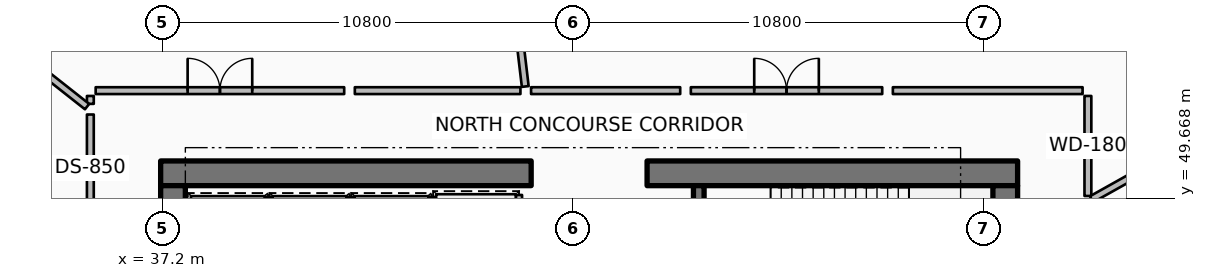
"""IFC4 building model, lengths in metres.
Left out: names, types, materials, properties, quantities, classifications, styles, units other than length and angle.
Written with IfcOpenShell. Run it as: python <this file> out.ifc"""

import sys

from ifc_helpers import new_model, si_unit, direction, frame, frame_2d, origin, place, context, subcontext, project, spatial, rectangle, extrude, element, fill, save


model = new_model("IFC4")
c1 = context("Model", 3, precision=1e-05, world=origin(), true_north=direction((0.0, 1.0)))
c2 = subcontext(c1, "Body", "Model", "MODEL_VIEW")
j1 = project(units=[si_unit("LENGTHUNIT", "METRE"), si_unit("PLANEANGLEUNIT", "RADIAN")], contexts=[c1])
p1 = place(None, origin())
s1 = spatial("IfcSite", under=j1, at=p1, CompositionType="ELEMENT")
p2 = place(p1, origin())
s2 = spatial("IfcBuilding", under=s1, at=p2, CompositionType="ELEMENT")
p3 = place(p2, frame((0.0, 0.0, 231.9)))
s3 = spatial("IfcBuildingStorey", under=s2, at=p3, CompositionType="ELEMENT", Elevation=231.9)
for number, where, z_axis, x_axis in (
    (1, (37.15, 50.325, 0.0), (0.0, 0.0, 1.0), (1.0, 0.0, 0.0)),
    (2, (49.95, 50.325, 0.0), (0.0, 0.0, 1.0), (1.0, 0.0, 0.0)),
):
    element("IfcWall", number, at=place(p3, frame(where, z_axis=z_axis, x_axis=x_axis)), inside=s3, PredefinedType="SHEAR", context=c2, shape_type="SweptSolid", body=[
        extrude(rectangle(XDim=9.75, YDim=0.65, at=frame_2d((4.875, 0.0))), origin(), (0.0, 0.0, 1.0), 4.8),
    ])
for number, where, z_axis, x_axis in (
    (3, (37.475, 34.0, 0.0), (0.0, 0.0, 1.0), (0.0, 1.0, 0.0)),
    (4, (59.375, 34.0, 0.0), (0.0, 0.0, 1.0), (0.0, 1.0, 0.0)),
):
    element("IfcWall", number, at=place(p3, frame(where, z_axis=z_axis, x_axis=x_axis)), inside=s3, PredefinedType="SHEAR", context=c2, shape_type="SweptSolid", body=[
        extrude(rectangle(XDim=16.0, YDim=0.65, at=frame_2d((8.0, 0.0))), origin(), (0.0, 0.0, 1.0), 4.8),
    ])
p4 = place(p3, frame((51.31, 46.5, 0.0), z_axis=(0.0, 0.0, 1.0), x_axis=(0.0, 1.0, 0.0)))
e5 = element("IfcWall", 5, at=p4, inside=s3, PredefinedType="SHEAR", context=c2, shape_type="SweptSolid", body=[
    extrude(rectangle(XDim=3.5, YDim=0.28, at=frame_2d((1.75, 0.0))), origin(), (0.0, 0.0, 1.0), 4.8),
])
for number, where, z_axis, x_axis in (
    (6, (39.975, 48.095, 0.0), (0.0, 0.0, 1.0), (0.0, 1.0, 0.0)),
    (7, (42.125, 48.095, 0.0), (0.0, 0.0, 1.0), (0.0, 1.0, 0.0)),
    (8, (44.275, 48.095, 0.0), (0.0, 0.0, 1.0), (0.0, 1.0, 0.0)),
):
    element("IfcWall", number, at=place(p3, frame(where, z_axis=z_axis, x_axis=x_axis)), inside=s3, PredefinedType="PARTITIONING", context=c2, shape_type="SweptSolid", body=[
        extrude(rectangle(XDim=1.61, YDim=0.16, at=frame_2d((0.805, 0.0))), origin(), (0.0, 0.0, 1.0), 4.4),
    ])
p5 = place(p3, frame((46.58, 48.045, 0.0), z_axis=(0.0, 0.0, 1.0), x_axis=(0.0, 1.0, 0.0)))
e9 = element("IfcWall", 9, at=p5, inside=s3, PredefinedType="PARTITIONING", context=c2, shape_type="SweptSolid", body=[
    extrude(rectangle(XDim=1.71, YDim=0.16, at=frame_2d((0.855, 0.0))), origin(), (0.0, 0.0, 1.0), 4.4),
])
p6 = place(p3, frame((61.55, 49.729, 0.0), z_axis=(0.0, 0.0, 1.0), x_axis=(0.0, 1.0, 0.0)))
e10 = element("IfcWall", 10, at=p6, inside=s3, PredefinedType="PARTITIONING", context=c2, shape_type="SweptSolid", body=[
    extrude(rectangle(XDim=2.632, YDim=0.18, at=frame_2d((1.316, 0.0))), origin(), (0.0, 0.0, 1.0), 3.357),
])
p7 = place(p3, frame((61.41, 52.5, 0.0), z_axis=(0.0, 0.0, 1.0), x_axis=(-1.0, 0.0, 0.0)))
e11 = element("IfcWall", 11, at=p7, inside=s3, PredefinedType="PARTITIONING", context=c2, shape_type="SweptSolid", body=[
    extrude(rectangle(XDim=4.992, YDim=0.18, at=frame_2d((2.496, 0.0))), origin(), (0.0, 0.0, 1.0), 3.357),
])
p8 = place(p3, frame((56.137, 52.5, 0.0), z_axis=(0.0, 0.0, 1.0), x_axis=(-1.0, 0.0, 0.0)))
e12 = element("IfcWall", 12, at=p8, inside=s3, PredefinedType="PARTITIONING", context=c2, shape_type="SweptSolid", body=[
    extrude(rectangle(XDim=5.036, YDim=0.18, at=frame_2d((2.518, 0.0))), origin(), (0.0, 0.0, 1.0), 3.357),
])
p9 = place(p8, frame((1.668, 0.0, 0.0)))
e13 = element("IfcOpeningElement", 13, at=p9, cuts=e12, PredefinedType="OPENING", context=c2, shape_type="SweptSolid", body=[
    extrude(rectangle(XDim=1.7, YDim=2.15, at=frame_2d((0.85, 1.075))), frame((0.0, 0.1, 0.0), z_axis=(0.0, -1.0, 0.0), x_axis=(1.0, 0.0, 0.0)), (0.0, 0.0, 1.0), 0.2),
])
p10 = place(p3, frame((50.821, 52.5, 0.0), z_axis=(0.0, 0.0, 1.0), x_axis=(-1.0, 0.0, 0.0)))
e14 = element("IfcWall", 14, at=p10, inside=s3, PredefinedType="PARTITIONING", context=c2, shape_type="SweptSolid", body=[
    extrude(rectangle(XDim=3.924, YDim=0.18, at=frame_2d((1.962, 0.0))), origin(), (0.0, 0.0, 1.0), 3.357),
])
p11 = place(p3, frame((61.646, 49.642, 0.0), z_axis=(0.0, 0.0, 1.0), x_axis=(0.872490621789, 0.488630857488, 0.0)))
e15 = element("IfcWall", 15, at=p11, inside=s3, PredefinedType="PARTITIONING", context=c2, shape_type="SweptSolid", body=[
    extrude(rectangle(XDim=13.522, YDim=0.18, at=frame_2d((6.761, 0.0))), origin(), (0.0, 0.0, 1.0), 3.357),
])
p12 = place(p3, frame((46.744, 52.609, 0.0), z_axis=(0.0, 0.0, 1.0), x_axis=(-0.117537360962, 0.993068461274, 0.0)))
e16 = element("IfcWall", 16, at=p12, inside=s3, PredefinedType="PARTITIONING", context=c2, shape_type="SweptSolid", body=[
    extrude(rectangle(XDim=12.982, YDim=0.18, at=frame_2d((6.491, 0.0))), origin(), (0.0, 0.0, 1.0), 3.357),
])
p13 = place(p3, frame((46.617, 52.5, 0.0), z_axis=(0.0, 0.0, 1.0), x_axis=(-1.0, 0.0, 0.0)))
e17 = element("IfcWall", 17, at=p13, inside=s3, PredefinedType="PARTITIONING", context=c2, shape_type="SweptSolid", body=[
    extrude(rectangle(XDim=4.357, YDim=0.18, at=frame_2d((2.179, 0.0))), origin(), (0.0, 0.0, 1.0), 3.357),
])
p14 = place(p3, frame((41.98, 52.5, 0.0), z_axis=(0.0, 0.0, 1.0), x_axis=(-1.0, 0.0, 0.0)))
e18 = element("IfcWall", 18, at=p14, inside=s3, PredefinedType="PARTITIONING", context=c2, shape_type="SweptSolid", body=[
    extrude(rectangle(XDim=6.54, YDim=0.18, at=frame_2d((3.27, 0.0))), origin(), (0.0, 0.0, 1.0), 3.357),
])
p15 = place(p14, frame((2.42, 0.0, 0.0)))
e19 = element("IfcOpeningElement", 19, at=p15, cuts=e18, PredefinedType="OPENING", context=c2, shape_type="SweptSolid", body=[
    extrude(rectangle(XDim=1.7, YDim=2.15, at=frame_2d((0.85, 1.075))), frame((0.0, 0.1, 0.0), z_axis=(0.0, -1.0, 0.0), x_axis=(1.0, 0.0, 0.0)), (0.0, 0.0, 1.0), 0.2),
])
p16 = place(p3, frame((35.3, 52.36, 0.0), z_axis=(0.0, 0.0, 1.0), x_axis=(0.0, -1.0, 0.0)))
e20 = element("IfcWall", 20, at=p16, inside=s3, PredefinedType="PARTITIONING", context=c2, shape_type="SweptSolid", body=[
    extrude(rectangle(XDim=0.208, YDim=0.18, at=frame_2d((0.104, 0.0))), origin(), (0.0, 0.0, 1.0), 3.357),
])
p17 = place(p3, frame((35.214, 52.08, 0.0), z_axis=(0.0, 0.0, 1.0), x_axis=(-0.785322491177, 0.619086896043, 0.0)))
e21 = element("IfcWall", 21, at=p17, inside=s3, PredefinedType="PARTITIONING", context=c2, shape_type="SweptSolid", body=[
    extrude(rectangle(XDim=9.674, YDim=0.18, at=frame_2d((4.837, 0.0))), origin(), (0.0, 0.0, 1.0), 3.357),
])
p18 = place(p3, frame((35.3, 51.872, 0.0), z_axis=(0.0, 0.0, 1.0), x_axis=(0.0, -1.0, 0.0)))
e22 = element("IfcWall", 22, at=p18, inside=s3, PredefinedType="PARTITIONING", context=c2, shape_type="SweptSolid", body=[
    extrude(rectangle(XDim=6.15, YDim=0.18, at=frame_2d((3.075, 0.0))), origin(), (0.0, 0.0, 1.0), 3.357),
])
p19 = place(p18, frame((2.65, 0.0, 0.0)))
e23 = element("IfcOpeningElement", 23, at=p19, cuts=e22, PredefinedType="OPENING", context=c2, shape_type="SweptSolid", body=[
    extrude(rectangle(XDim=0.85, YDim=2.06, at=frame_2d((0.425, 1.03))), frame((0.0, 0.1, 0.0), z_axis=(0.0, -1.0, 0.0), x_axis=(1.0, 0.0, 0.0)), (0.0, 0.0, 1.0), 0.2),
])
p20 = place(p3, frame((35.194, 45.612, 0.0), z_axis=(0.0, 0.0, 1.0), x_axis=(-0.962460537185, 0.271421654186, 0.0)))
e24 = element("IfcWall", 24, at=p20, inside=s3, PredefinedType="PARTITIONING", context=c2, shape_type="SweptSolid", body=[
    extrude(rectangle(XDim=15.057, YDim=0.18, at=frame_2d((7.529, 0.0))), origin(), (0.0, 0.0, 1.0), 3.357),
])
p21 = place(p9, origin())
e25 = element("IfcDoor", 25, at=p21, inside=s3, OperationType="DOUBLE_DOOR_SINGLE_SWING", PredefinedType="DOOR", context=c2, shape_type="SweptSolid", body=[
    extrude(rectangle(XDim=1.7, YDim=2.15, at=frame_2d((0.85, 1.075))), frame((0.0, 0.025, 0.0), z_axis=(0.0, -1.0, 0.0), x_axis=(1.0, 0.0, 0.0)), (0.0, 0.0, 1.0), 0.05),
])
fill(e13, e25)
p22 = place(p15, origin())
e26 = element("IfcDoor", 26, at=p22, inside=s3, OperationType="DOUBLE_DOOR_SINGLE_SWING", PredefinedType="DOOR", context=c2, shape_type="SweptSolid", body=[
    extrude(rectangle(XDim=1.7, YDim=2.15, at=frame_2d((0.85, 1.075))), frame((0.0, 0.025, 0.0), z_axis=(0.0, -1.0, 0.0), x_axis=(1.0, 0.0, 0.0)), (0.0, 0.0, 1.0), 0.05),
])
fill(e19, e26)
save(model, sys.argv[1])
